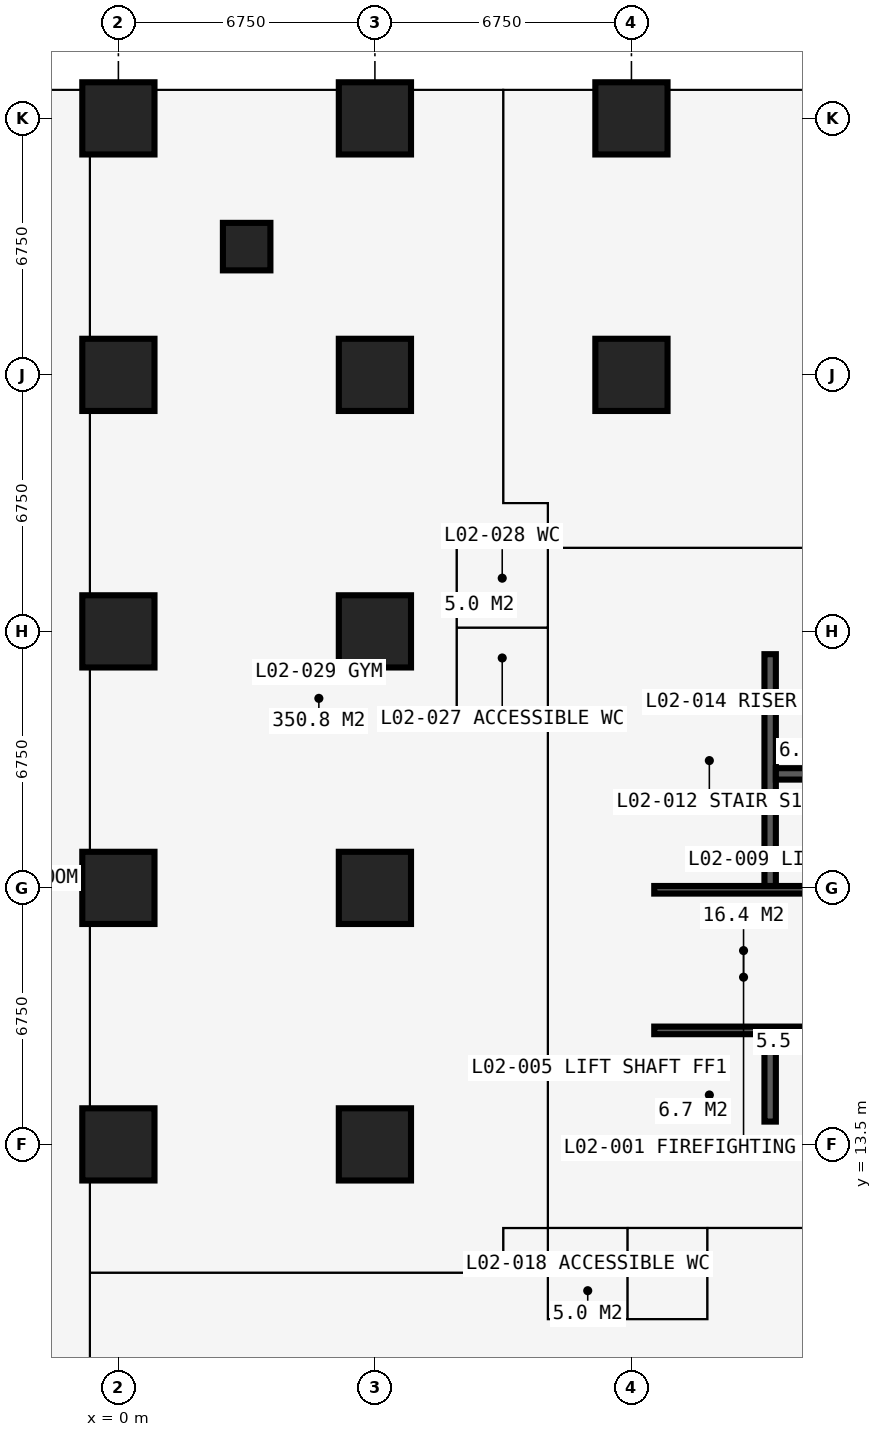
"""IFC4 building model, lengths in metres.
Left out: names, types, materials, properties, quantities, classifications, styles, units other than length and angle.
Written with IfcOpenShell. Run it as: python <this file> out.ifc"""

import sys

from ifc_helpers import new_model, si_unit, direction, frame, frame_2d, origin, origin_2d, place, context, subcontext, project, spatial, rectangle, extrude, element, fill, save


model = new_model("IFC4")
c1 = context("Model", 3, precision=1e-05, world=origin(), true_north=direction((0.0, 1.0)))
c2 = subcontext(c1, "Body", "Model", "MODEL_VIEW")
j1 = project(units=[si_unit("LENGTHUNIT", "METRE"), si_unit("PLANEANGLEUNIT", "RADIAN")], contexts=[c1])
p1 = place(None, origin())
s1 = spatial("IfcSite", under=j1, at=p1, CompositionType="ELEMENT")
p2 = place(p1, origin())
s2 = spatial("IfcBuilding", under=s1, at=p2, CompositionType="ELEMENT")
p3 = place(p2, frame((0.0, 0.0, 9.0)))
s3 = spatial("IfcBuildingStorey", under=s2, at=p3, CompositionType="ELEMENT", Elevation=9.0)
for number, where, z_axis, x_axis in (
    (1, (0.0, 13.5, 0.0), (0.0, 0.0, 1.0), (1.0, 0.0, 0.0)),
    (2, (0.0, 20.25, 0.0), (0.0, 0.0, 1.0), (1.0, 0.0, 0.0)),
    (3, (0.0, 27.0, 0.0), (0.0, 0.0, 1.0), (1.0, 0.0, 0.0)),
    (4, (0.0, 33.75, 0.0), (0.0, 0.0, 1.0), (1.0, 0.0, 0.0)),
    (5, (0.0, 40.5, 0.0), (0.0, 0.0, 1.0), (1.0, 0.0, 0.0)),
):
    element("IfcColumn", number, at=place(p3, frame(where, z_axis=z_axis, x_axis=x_axis)), inside=s3, PredefinedType="COLUMN", context=c2, shape_type="SweptSolid", body=[
        extrude(rectangle(XDim=1.9, YDim=1.9, at=origin_2d()), origin(), (0.0, 0.0, 1.0), 4.5),
    ])
p4 = place(p3, frame((3.375, 37.125, 0.0), z_axis=(0.0, 0.0, 1.0), x_axis=(1.0, 0.0, 0.0)))
e6 = element("IfcColumn", 6, at=p4, inside=s3, PredefinedType="COLUMN", context=c2, shape_type="SweptSolid", body=[
    extrude(rectangle(XDim=1.25, YDim=1.25, at=origin_2d()), origin(), (0.0, 0.0, 1.0), 4.5),
])
for number, where, z_axis, x_axis in (
    (7, (6.75, 13.5, 0.0), (0.0, 0.0, 1.0), (1.0, 0.0, 0.0)),
    (8, (6.75, 20.25, 0.0), (0.0, 0.0, 1.0), (1.0, 0.0, 0.0)),
    (9, (6.75, 27.0, 0.0), (0.0, 0.0, 1.0), (1.0, 0.0, 0.0)),
    (10, (6.75, 33.75, 0.0), (0.0, 0.0, 1.0), (1.0, 0.0, 0.0)),
    (11, (6.75, 40.5, 0.0), (0.0, 0.0, 1.0), (1.0, 0.0, 0.0)),
    (12, (13.5, 33.75, 0.0), (0.0, 0.0, 1.0), (1.0, 0.0, 0.0)),
    (13, (13.5, 40.5, 0.0), (0.0, 0.0, 1.0), (1.0, 0.0, 0.0)),
):
    element("IfcColumn", number, at=place(p3, frame(where, z_axis=z_axis, x_axis=x_axis)), inside=s3, PredefinedType="COLUMN", context=c2, shape_type="SweptSolid", body=[
        extrude(rectangle(XDim=1.9, YDim=1.9, at=origin_2d()), origin(), (0.0, 0.0, 1.0), 4.5),
    ])
p5 = place(p3, frame((12.9, 13.5, 0.0), z_axis=(0.0, 0.0, 1.0), x_axis=(1.0, 0.0, 0.0)))
e14 = element("IfcWall", 14, at=p5, inside=s3, PredefinedType="SHEAR", context=c2, shape_type="SweptSolid", body=[
    extrude(rectangle(XDim=14.7, YDim=1.2, at=frame_2d((7.35, 0.0))), origin(), (0.0, 0.0, 1.0), 4.5),
])
p6 = place(p3, frame((27.6, 27.0, 0.0), z_axis=(0.0, 0.0, 1.0), x_axis=(-1.0, 0.0, 0.0)))
e15 = element("IfcWall", 15, at=p6, inside=s3, PredefinedType="SHEAR", context=c2, shape_type="SweptSolid", body=[
    extrude(rectangle(XDim=14.7, YDim=1.2, at=frame_2d((7.35, 0.0))), origin(), (0.0, 0.0, 1.0), 4.5),
])
p7 = place(p6, frame((5.225, 0.0, 0.0)))
e16 = element("IfcOpeningElement", 16, at=p7, cuts=e15, PredefinedType="OPENING", context=c2, shape_type="SweptSolid", body=[
    extrude(rectangle(XDim=0.9, YDim=2.2, at=frame_2d((0.45, 1.1))), frame((0.0, 0.61, 0.0), z_axis=(0.0, -1.0, 0.0), x_axis=(1.0, 0.0, 0.0)), (0.0, 0.0, 1.0), 1.22),
])
p8 = place(p6, frame((8.2, 0.0, 0.0)))
e17 = element("IfcOpeningElement", 17, at=p8, cuts=e15, PredefinedType="OPENING", context=c2, shape_type="SweptSolid", body=[
    extrude(rectangle(XDim=1.0, YDim=2.2, at=frame_2d((0.5, 1.1))), frame((0.0, 0.61, 0.0), z_axis=(0.0, -1.0, 0.0), x_axis=(1.0, 0.0, 0.0)), (0.0, 0.0, 1.0), 1.22),
])
p9 = place(p3, frame((13.5, 26.4, 0.0), z_axis=(0.0, 0.0, 1.0), x_axis=(0.0, -1.0, 0.0)))
e18 = element("IfcWall", 18, at=p9, inside=s3, PredefinedType="SHEAR", context=c2, shape_type="SweptSolid", body=[
    extrude(rectangle(XDim=12.3, YDim=1.2, at=frame_2d((6.15, 0.0))), origin(), (0.0, 0.0, 1.0), 4.5),
])
p10 = place(p9, frame((7.45, 0.0, 0.0)))
e19 = element("IfcOpeningElement", 19, at=p10, cuts=e18, PredefinedType="OPENING", context=c2, shape_type="SweptSolid", body=[
    extrude(rectangle(XDim=1.2, YDim=2.2, at=frame_2d((0.6, 1.1))), frame((0.0, 0.61, 0.0), z_axis=(0.0, -1.0, 0.0), x_axis=(1.0, 0.0, 0.0)), (0.0, 0.0, 1.0), 1.22),
])
p11 = place(p3, frame((14.1, 16.5, 0.0), z_axis=(0.0, 0.0, 1.0), x_axis=(1.0, 0.0, 0.0)))
e20 = element("IfcWall", 20, at=p11, inside=s3, PredefinedType="SHEAR", context=c2, shape_type="SweptSolid", body=[
    extrude(rectangle(XDim=12.3, YDim=0.2, at=frame_2d((6.15, 0.0))), origin(), (0.0, 0.0, 1.0), 4.5),
])
p12 = place(p11, frame((0.9, 0.0, 0.0)))
e21 = element("IfcOpeningElement", 21, at=p12, cuts=e20, PredefinedType="OPENING", context=c2, shape_type="SweptSolid", body=[
    extrude(rectangle(XDim=1.1, YDim=2.2, at=frame_2d((0.55, 1.1))), frame((0.0, 0.11, 0.0), z_axis=(0.0, -1.0, 0.0), x_axis=(1.0, 0.0, 0.0)), (0.0, 0.0, 1.0), 0.22),
])
p13 = place(p11, frame((9.5, 0.0, 0.0)))
e22 = element("IfcOpeningElement", 22, at=p13, cuts=e20, PredefinedType="OPENING", context=c2, shape_type="SweptSolid", body=[
    extrude(rectangle(XDim=1.1, YDim=2.2, at=frame_2d((0.55, 1.1))), frame((0.0, 0.11, 0.0), z_axis=(0.0, -1.0, 0.0), x_axis=(1.0, 0.0, 0.0)), (0.0, 0.0, 1.0), 0.22),
])
p14 = place(p3, frame((14.1, 20.2, 0.0), z_axis=(0.0, 0.0, 1.0), x_axis=(1.0, 0.0, 0.0)))
e23 = element("IfcWall", 23, at=p14, inside=s3, PredefinedType="SHEAR", context=c2, shape_type="SweptSolid", body=[
    extrude(rectangle(XDim=12.3, YDim=0.2, at=frame_2d((6.15, 0.0))), origin(), (0.0, 0.0, 1.0), 4.5),
])
p15 = place(p14, frame((0.35, 0.0, 0.0)))
e24 = element("IfcOpeningElement", 24, at=p15, cuts=e23, PredefinedType="OPENING", context=c2, shape_type="SweptSolid", body=[
    extrude(rectangle(XDim=1.1, YDim=2.2, at=frame_2d((0.55, 1.1))), frame((0.0, 0.11, 0.0), z_axis=(0.0, -1.0, 0.0), x_axis=(1.0, 0.0, 0.0)), (0.0, 0.0, 1.0), 0.22),
])
p16 = place(p14, frame((9.75, 0.0, 0.0)))
e25 = element("IfcOpeningElement", 25, at=p16, cuts=e23, PredefinedType="OPENING", context=c2, shape_type="SweptSolid", body=[
    extrude(rectangle(XDim=1.1, YDim=2.2, at=frame_2d((0.55, 1.1))), frame((0.0, 0.11, 0.0), z_axis=(0.0, -1.0, 0.0), x_axis=(1.0, 0.0, 0.0)), (0.0, 0.0, 1.0), 0.22),
])
p17 = place(p3, frame((17.15, 20.3, 0.0), z_axis=(0.0, 0.0, 1.0), x_axis=(0.0, 1.0, 0.0)))
e26 = element("IfcWall", 26, at=p17, inside=s3, PredefinedType="SHEAR", context=c2, shape_type="SweptSolid", body=[
    extrude(rectangle(XDim=6.1, YDim=0.3, at=frame_2d((3.05, 0.0))), origin(), (0.0, 0.0, 1.0), 4.5),
])
p18 = place(p3, frame((17.3, 23.25, 0.0), z_axis=(0.0, 0.0, 1.0), x_axis=(1.0, 0.0, 0.0)))
e27 = element("IfcWall", 27, at=p18, inside=s3, PredefinedType="SHEAR", context=c2, shape_type="SweptSolid", body=[
    extrude(rectangle(XDim=5.9, YDim=0.3, at=frame_2d((2.95, 0.0))), origin(), (0.0, 0.0, 1.0), 4.5),
])
p19 = place(p3, frame((17.15, 14.1, 0.0), z_axis=(0.0, 0.0, 1.0), x_axis=(0.0, 1.0, 0.0)))
e28 = element("IfcWall", 28, at=p19, inside=s3, PredefinedType="SHEAR", context=c2, shape_type="SweptSolid", body=[
    extrude(rectangle(XDim=2.3, YDim=0.3, at=frame_2d((1.15, 0.0))), origin(), (0.0, 0.0, 1.0), 4.5),
])
p20 = place(p3, frame((-0.75, -0.75, 0.0), z_axis=(0.0, 0.0, 1.0), x_axis=(0.0, 1.0, 0.0)))
e29 = element("IfcWall", 29, at=p20, inside=s3, PredefinedType="PARTITIONING", context=c2, shape_type="SweptSolid", body=[
    extrude(rectangle(XDim=41.984, YDim=0.15, at=frame_2d((20.992, 0.0))), origin(), (0.0, 0.0, 1.0), 4.25),
])
p21 = place(p20, frame((4.65, 0.0, 0.0)))
e30 = element("IfcOpeningElement", 30, at=p21, cuts=e29, PredefinedType="OPENING", context=c2, shape_type="SweptSolid", body=[
    extrude(rectangle(XDim=1.6, YDim=2.4, at=frame_2d((0.8, 1.2))), frame((0.0, 0.085, 0.0), z_axis=(0.0, -1.0, 0.0), x_axis=(1.0, 0.0, 0.0)), (0.0, 0.0, 1.0), 0.17),
])
p22 = place(p3, frame((-0.75, 10.125, 0.0), z_axis=(0.0, 0.0, 1.0), x_axis=(1.0, 0.0, 0.0)))
e31 = element("IfcWall", 31, at=p22, inside=s3, PredefinedType="PARTITIONING", context=c2, shape_type="SweptSolid", body=[
    extrude(rectangle(XDim=10.875, YDim=0.15, at=frame_2d((5.438, 0.0))), origin(), (0.0, 0.0, 1.0), 4.25),
])
p23 = place(p3, frame((8.9, 25.0, 0.0), z_axis=(0.0, 0.0, 1.0), x_axis=(0.0, 1.0, 0.0)))
e32 = element("IfcWall", 32, at=p23, inside=s3, PredefinedType="PARTITIONING", context=c2, shape_type="SweptSolid", body=[
    extrude(rectangle(XDim=4.2, YDim=0.15, at=frame_2d((2.1, 0.0))), origin(), (0.0, 0.0, 1.0), 4.25),
])
p24 = place(p3, frame((8.9, 25.0, 0.0), z_axis=(0.0, 0.0, 1.0), x_axis=(1.0, 0.0, 0.0)))
e33 = element("IfcWall", 33, at=p24, inside=s3, PredefinedType="PARTITIONING", context=c2, shape_type="SweptSolid", body=[
    extrude(rectangle(XDim=2.4, YDim=0.1, at=frame_2d((1.2, 0.0))), origin(), (0.0, 0.0, 1.0), 4.25),
])
p25 = place(p3, frame((8.9, 27.1, 0.0), z_axis=(0.0, 0.0, 1.0), x_axis=(1.0, 0.0, 0.0)))
e34 = element("IfcWall", 34, at=p25, inside=s3, PredefinedType="PARTITIONING", context=c2, shape_type="SweptSolid", body=[
    extrude(rectangle(XDim=2.4, YDim=0.1, at=frame_2d((1.2, 0.0))), origin(), (0.0, 0.0, 1.0), 3.752),
])
p26 = place(p3, frame((8.9, 29.2, 0.0), z_axis=(0.0, 0.0, 1.0), x_axis=(1.0, 0.0, 0.0)))
e35 = element("IfcWall", 35, at=p26, inside=s3, PredefinedType="PARTITIONING", context=c2, shape_type="SweptSolid", body=[
    extrude(rectangle(XDim=21.475, YDim=0.15, at=frame_2d((10.738, 0.0))), origin(), (0.0, 0.0, 1.0), 4.25),
])
p27 = place(p26, frame((16.65, 0.0, 0.0)))
e36 = element("IfcOpeningElement", 36, at=p27, cuts=e35, PredefinedType="OPENING", context=c2, shape_type="SweptSolid", body=[
    extrude(rectangle(XDim=1.0, YDim=2.2, at=frame_2d((0.5, 1.1))), frame((0.0, 0.085, 0.0), z_axis=(0.0, -1.0, 0.0), x_axis=(1.0, 0.0, 0.0)), (0.0, 0.0, 1.0), 0.17),
])
p28 = place(p26, frame((18.75, 0.0, 0.0)))
e37 = element("IfcOpeningElement", 37, at=p28, cuts=e35, PredefinedType="OPENING", context=c2, shape_type="SweptSolid", body=[
    extrude(rectangle(XDim=1.0, YDim=2.2, at=frame_2d((0.5, 1.1))), frame((0.0, 0.085, 0.0), z_axis=(0.0, -1.0, 0.0), x_axis=(1.0, 0.0, 0.0)), (0.0, 0.0, 1.0), 0.17),
])
p29 = place(p26, frame((8.45, 0.0, 0.0)))
e38 = element("IfcOpeningElement", 38, at=p29, cuts=e35, PredefinedType="OPENING", context=c2, shape_type="SweptSolid", body=[
    extrude(rectangle(XDim=1.6, YDim=2.4, at=frame_2d((0.8, 1.2))), frame((0.0, 0.085, 0.0), z_axis=(0.0, -1.0, 0.0), x_axis=(1.0, 0.0, 0.0)), (0.0, 0.0, 1.0), 0.17),
])
p30 = place(p3, frame((10.125, 10.125, 0.0), z_axis=(0.0, 0.0, 1.0), x_axis=(0.0, 1.0, 0.0)))
e39 = element("IfcWall", 39, at=p30, inside=s3, PredefinedType="PARTITIONING", context=c2, shape_type="SweptSolid", body=[
    extrude(rectangle(XDim=1.175, YDim=0.15, at=frame_2d((0.587, 0.0))), origin(), (0.0, 0.0, 1.0), 4.25),
])
p31 = place(p3, frame((10.125, 11.3, 0.0), z_axis=(0.0, 0.0, 1.0), x_axis=(1.0, 0.0, 0.0)))
e40 = element("IfcWall", 40, at=p31, inside=s3, PredefinedType="PARTITIONING", context=c2, shape_type="SweptSolid", body=[
    extrude(rectangle(XDim=20.675, YDim=0.15, at=frame_2d((10.337, 0.0))), origin(), (0.0, 0.0, 1.0), 4.25),
])
p32 = place(p31, frame((1.725, 0.0, 0.0)))
e41 = element("IfcOpeningElement", 41, at=p32, cuts=e40, PredefinedType="OPENING", context=c2, shape_type="SweptSolid", body=[
    extrude(rectangle(XDim=1.0, YDim=2.2, at=frame_2d((0.5, 1.1))), frame((0.0, 0.085, 0.0), z_axis=(0.0, -1.0, 0.0), x_axis=(1.0, 0.0, 0.0)), (0.0, 0.0, 1.0), 0.17),
])
p33 = place(p31, frame((3.825, 0.0, 0.0)))
e42 = element("IfcOpeningElement", 42, at=p33, cuts=e40, PredefinedType="OPENING", context=c2, shape_type="SweptSolid", body=[
    extrude(rectangle(XDim=1.0, YDim=2.2, at=frame_2d((0.5, 1.1))), frame((0.0, 0.085, 0.0), z_axis=(0.0, -1.0, 0.0), x_axis=(1.0, 0.0, 0.0)), (0.0, 0.0, 1.0), 0.17),
])
p34 = place(p31, frame((10.675, 0.0, 0.0)))
e43 = element("IfcOpeningElement", 43, at=p34, cuts=e40, PredefinedType="OPENING", context=c2, shape_type="SweptSolid", body=[
    extrude(rectangle(XDim=1.5, YDim=2.2, at=frame_2d((0.75, 1.1))), frame((0.0, 0.085, 0.0), z_axis=(0.0, -1.0, 0.0), x_axis=(1.0, 0.0, 0.0)), (0.0, 0.0, 1.0), 0.17),
])
p35 = place(p3, frame((10.125, 30.375, 0.0), z_axis=(0.0, 0.0, 1.0), x_axis=(0.0, 1.0, 0.0)))
e44 = element("IfcWall", 44, at=p35, inside=s3, PredefinedType="PARTITIONING", context=c2, shape_type="SweptSolid", body=[
    extrude(rectangle(XDim=10.859, YDim=0.15, at=frame_2d((5.429, 0.0))), origin(), (0.0, 0.0, 1.0), 4.25),
])
p36 = place(p3, frame((10.125, 30.375, 0.0), z_axis=(0.0, 0.0, 1.0), x_axis=(1.0, 0.0, 0.0)))
e45 = element("IfcWall", 45, at=p36, inside=s3, PredefinedType="PARTITIONING", context=c2, shape_type="SweptSolid", body=[
    extrude(rectangle(XDim=1.175, YDim=0.15, at=frame_2d((0.587, 0.0))), origin(), (0.0, 0.0, 1.0), 4.25),
])
p37 = place(p3, frame((11.3, 8.9, 0.0), z_axis=(0.0, 0.0, 1.0), x_axis=(0.0, 1.0, 0.0)))
e46 = element("IfcWall", 46, at=p37, inside=s3, PredefinedType="PARTITIONING", context=c2, shape_type="SweptSolid", body=[
    extrude(rectangle(XDim=21.475, YDim=0.15, at=frame_2d((10.738, 0.0))), origin(), (0.0, 0.0, 1.0), 4.25),
])
p38 = place(p37, frame((16.65, 0.0, 0.0)))
e47 = element("IfcOpeningElement", 47, at=p38, cuts=e46, PredefinedType="OPENING", context=c2, shape_type="SweptSolid", body=[
    extrude(rectangle(XDim=1.0, YDim=2.2, at=frame_2d((0.5, 1.1))), frame((0.0, 0.085, 0.0), z_axis=(0.0, -1.0, 0.0), x_axis=(1.0, 0.0, 0.0)), (0.0, 0.0, 1.0), 0.17),
])
p39 = place(p37, frame((18.75, 0.0, 0.0)))
e48 = element("IfcOpeningElement", 48, at=p39, cuts=e46, PredefinedType="OPENING", context=c2, shape_type="SweptSolid", body=[
    extrude(rectangle(XDim=1.0, YDim=2.2, at=frame_2d((0.5, 1.1))), frame((0.0, 0.085, 0.0), z_axis=(0.0, -1.0, 0.0), x_axis=(1.0, 0.0, 0.0)), (0.0, 0.0, 1.0), 0.17),
])
p40 = place(p37, frame((8.45, 0.0, 0.0)))
e49 = element("IfcOpeningElement", 49, at=p40, cuts=e46, PredefinedType="OPENING", context=c2, shape_type="SweptSolid", body=[
    extrude(rectangle(XDim=1.6, YDim=2.4, at=frame_2d((0.8, 1.2))), frame((0.0, 0.085, 0.0), z_axis=(0.0, -1.0, 0.0), x_axis=(1.0, 0.0, 0.0)), (0.0, 0.0, 1.0), 0.17),
])
p41 = place(p3, frame((11.3, 8.9, 0.0), z_axis=(0.0, 0.0, 1.0), x_axis=(1.0, 0.0, 0.0)))
e50 = element("IfcWall", 50, at=p41, inside=s3, PredefinedType="PARTITIONING", context=c2, shape_type="SweptSolid", body=[
    extrude(rectangle(XDim=4.2, YDim=0.15, at=frame_2d((2.1, 0.0))), origin(), (0.0, 0.0, 1.0), 4.25),
])
p42 = place(p3, frame((13.4, 8.9, 0.0), z_axis=(0.0, 0.0, 1.0), x_axis=(0.0, 1.0, 0.0)))
e51 = element("IfcWall", 51, at=p42, inside=s3, PredefinedType="PARTITIONING", context=c2, shape_type="SweptSolid", body=[
    extrude(rectangle(XDim=2.4, YDim=0.1, at=frame_2d((1.2, 0.0))), origin(), (0.0, 0.0, 1.0), 3.752),
])
p43 = place(p3, frame((15.5, 8.9, 0.0), z_axis=(0.0, 0.0, 1.0), x_axis=(0.0, 1.0, 0.0)))
e52 = element("IfcWall", 52, at=p43, inside=s3, PredefinedType="PARTITIONING", context=c2, shape_type="SweptSolid", body=[
    extrude(rectangle(XDim=2.4, YDim=0.1, at=frame_2d((1.2, 0.0))), origin(), (0.0, 0.0, 1.0), 4.25),
])
p44 = place(p12, origin())
e53 = element("IfcDoor", 53, at=p44, inside=s3, OperationType="DOUBLE_DOOR_SLIDING", PredefinedType="DOOR", context=c2, shape_type="SweptSolid", body=[
    extrude(rectangle(XDim=1.1, YDim=2.2, at=frame_2d((0.55, 1.1))), frame((0.0, 0.025, 0.0), z_axis=(0.0, -1.0, 0.0), x_axis=(1.0, 0.0, 0.0)), (0.0, 0.0, 1.0), 0.05),
])
fill(e21, e53)
p45 = place(p10, origin())
e54 = element("IfcDoor", 54, at=p45, inside=s3, OperationType="DOUBLE_DOOR_SINGLE_SWING", PredefinedType="DOOR", context=c2, shape_type="SweptSolid", body=[
    extrude(rectangle(XDim=1.2, YDim=2.2, at=frame_2d((0.6, 1.1))), frame((0.0, 0.025, 0.0), z_axis=(0.0, -1.0, 0.0), x_axis=(1.0, 0.0, 0.0)), (0.0, 0.0, 1.0), 0.05),
])
fill(e19, e54)
p46 = place(p15, origin())
e55 = element("IfcDoor", 55, at=p46, inside=s3, OperationType="SINGLE_SWING_LEFT", PredefinedType="DOOR", context=c2, shape_type="SweptSolid", body=[
    extrude(rectangle(XDim=1.1, YDim=2.2, at=frame_2d((0.55, 1.1))), frame((0.0, 0.025, 0.0), z_axis=(0.0, -1.0, 0.0), x_axis=(1.0, 0.0, 0.0)), (0.0, 0.0, 1.0), 0.05),
])
fill(e24, e55)
p47 = place(p32, origin())
e56 = element("IfcDoor", 56, at=p47, inside=s3, OperationType="SINGLE_SWING_LEFT", PredefinedType="DOOR", context=c2, shape_type="SweptSolid", body=[
    extrude(rectangle(XDim=1.0, YDim=2.2, at=frame_2d((0.5, 1.1))), frame((0.0, 0.025, 0.0), z_axis=(0.0, -1.0, 0.0), x_axis=(1.0, 0.0, 0.0)), (0.0, 0.0, 1.0), 0.05),
])
fill(e41, e56)
p48 = place(p33, origin())
e57 = element("IfcDoor", 57, at=p48, inside=s3, OperationType="SINGLE_SWING_LEFT", PredefinedType="DOOR", context=c2, shape_type="SweptSolid", body=[
    extrude(rectangle(XDim=1.0, YDim=2.2, at=frame_2d((0.5, 1.1))), frame((0.0, 0.025, 0.0), z_axis=(0.0, -1.0, 0.0), x_axis=(1.0, 0.0, 0.0)), (0.0, 0.0, 1.0), 0.05),
])
fill(e42, e57)
p49 = place(p29, origin())
e58 = element("IfcDoor", 58, at=p49, inside=s3, OperationType="DOUBLE_DOOR_SINGLE_SWING", PredefinedType="DOOR", context=c2, shape_type="SweptSolid", body=[
    extrude(rectangle(XDim=1.6, YDim=2.4, at=frame_2d((0.8, 1.2))), frame((0.0, 0.025, 0.0), z_axis=(0.0, -1.0, 0.0), x_axis=(1.0, 0.0, 0.0)), (0.0, 0.0, 1.0), 0.05),
])
fill(e38, e58)
p50 = place(p38, origin())
e59 = element("IfcDoor", 59, at=p50, inside=s3, OperationType="SINGLE_SWING_LEFT", PredefinedType="DOOR", context=c2, shape_type="SweptSolid", body=[
    extrude(rectangle(XDim=1.0, YDim=2.2, at=frame_2d((0.5, 1.1))), frame((0.0, 0.025, 0.0), z_axis=(0.0, -1.0, 0.0), x_axis=(1.0, 0.0, 0.0)), (0.0, 0.0, 1.0), 0.05),
])
fill(e47, e59)
p51 = place(p39, origin())
e60 = element("IfcDoor", 60, at=p51, inside=s3, OperationType="SINGLE_SWING_LEFT", PredefinedType="DOOR", context=c2, shape_type="SweptSolid", body=[
    extrude(rectangle(XDim=1.0, YDim=2.2, at=frame_2d((0.5, 1.1))), frame((0.0, 0.025, 0.0), z_axis=(0.0, -1.0, 0.0), x_axis=(1.0, 0.0, 0.0)), (0.0, 0.0, 1.0), 0.05),
])
fill(e48, e60)
p52 = place(p40, origin())
e61 = element("IfcDoor", 61, at=p52, inside=s3, OperationType="DOUBLE_DOOR_SINGLE_SWING", PredefinedType="DOOR", context=c2, shape_type="SweptSolid", body=[
    extrude(rectangle(XDim=1.6, YDim=2.4, at=frame_2d((0.8, 1.2))), frame((0.0, 0.025, 0.0), z_axis=(0.0, -1.0, 0.0), x_axis=(1.0, 0.0, 0.0)), (0.0, 0.0, 1.0), 0.05),
])
fill(e49, e61)
save(model, sys.argv[1])
